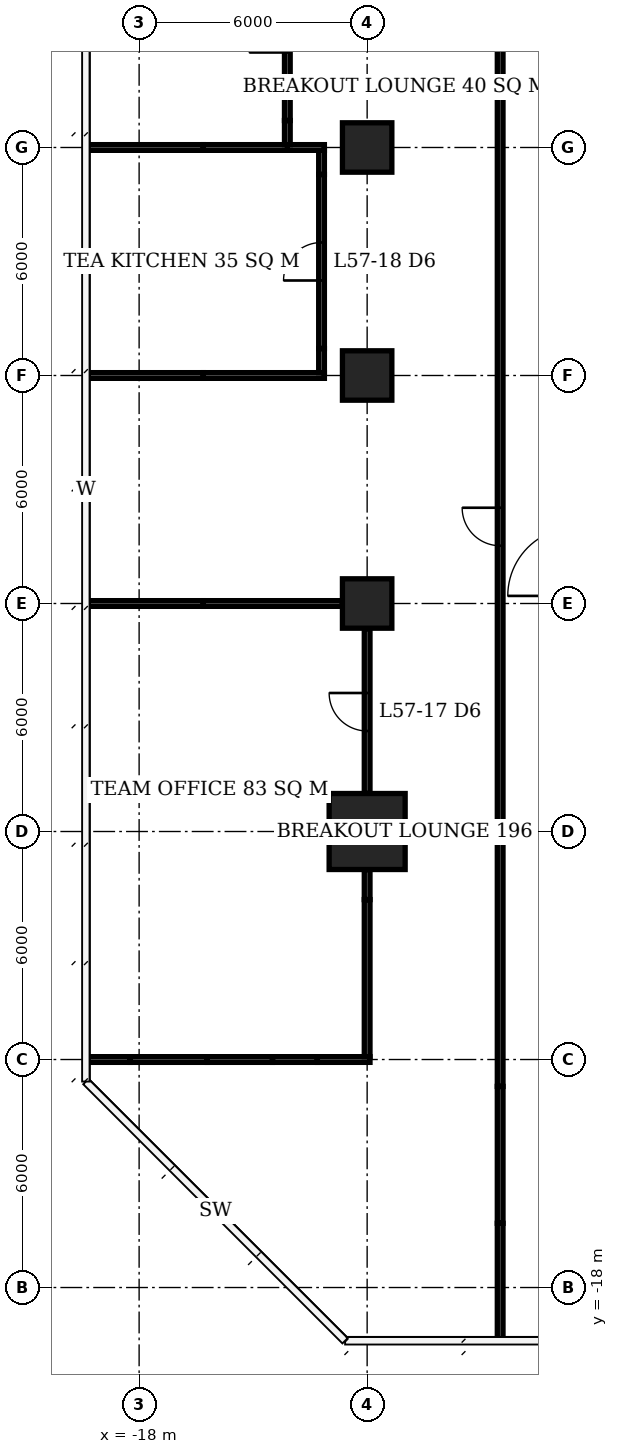
"""IFC4 building model, lengths in metres.
Left out: names, types, materials, properties, quantities, classifications, styles, units other than length and angle.
Written with IfcOpenShell. Run it as: python <this file> out.ifc"""

import sys

from ifc_helpers import new_model, si_unit, direction, frame, frame_2d, origin, origin_2d, place, context, subcontext, project, spatial, rectangle, extrude, element, fill, save


model = new_model("IFC4")
c1 = context("Model", 3, precision=1e-05, world=origin(), true_north=direction((0.0, 1.0)))
c2 = subcontext(c1, "Body", "Model", "MODEL_VIEW")
j1 = project(units=[si_unit("LENGTHUNIT", "METRE"), si_unit("PLANEANGLEUNIT", "RADIAN")], contexts=[c1])
p1 = place(None, origin())
s1 = spatial("IfcSite", under=j1, at=p1, CompositionType="ELEMENT")
p2 = place(p1, origin())
s2 = spatial("IfcBuilding", under=s1, at=p2, CompositionType="ELEMENT")
p3 = place(p2, frame((0.0, 0.0, 231.8)))
s3 = spatial("IfcBuildingStorey", under=s2, at=p3, CompositionType="ELEMENT", Elevation=231.8)
p4 = place(p3, frame((-12.0, -6.0, 0.0), z_axis=(0.0, 0.0, 1.0), x_axis=(1.0, 0.0, 0.0)))
e1 = element("IfcColumn", 1, at=p4, inside=s3, PredefinedType="COLUMN", context=c2, shape_type="SweptSolid", body=[
    extrude(rectangle(XDim=2.0, YDim=2.0, at=origin_2d()), origin(), (0.0, 0.0, 1.0), 3.9),
])
for number, where, z_axis, x_axis in (
    (2, (-12.0, 0.0, 0.0), (0.0, 0.0, 1.0), (1.0, 0.0, 0.0)),
    (3, (-12.0, 6.0, 0.0), (0.0, 0.0, 1.0), (1.0, 0.0, 0.0)),
    (4, (-12.0, 12.0, 0.0), (0.0, 0.0, 1.0), (1.0, 0.0, 0.0)),
):
    element("IfcColumn", number, at=place(p3, frame(where, z_axis=z_axis, x_axis=x_axis)), inside=s3, PredefinedType="COLUMN", context=c2, shape_type="SweptSolid", body=[
        extrude(rectangle(XDim=1.3, YDim=1.3, at=origin_2d()), origin(), (0.0, 0.0, 1.0), 3.9),
    ])
p5 = place(p3, frame((-19.4, -12.0, 0.0), z_axis=(0.0, 0.0, 1.0), x_axis=(1.0, 0.0, 0.0)))
e5 = element("IfcWall", 5, at=p5, inside=s3, PredefinedType="PARTITIONING", context=c2, shape_type="SweptSolid", body=[
    extrude(rectangle(XDim=1.163, YDim=0.15, at=frame_2d((0.582, 0.0))), origin(), (0.0, 0.0, 1.0), 3.65),
])
p6 = place(p3, frame((-18.237, -12.0, 0.0), z_axis=(0.0, 0.0, 1.0), x_axis=(1.0, 0.0, 0.0)))
e6 = element("IfcWall", 6, at=p6, inside=s3, PredefinedType="PARTITIONING", context=c2, shape_type="SweptSolid", body=[
    extrude(rectangle(XDim=2.029, YDim=0.15, at=frame_2d((1.015, 0.0))), origin(), (0.0, 0.0, 1.0), 2.65),
])
p7 = place(p3, frame((-16.208, -12.0, 0.0), z_axis=(0.0, 0.0, 1.0), x_axis=(1.0, 0.0, 0.0)))
e7 = element("IfcWall", 7, at=p7, inside=s3, PredefinedType="PARTITIONING", context=c2, shape_type="SweptSolid", body=[
    extrude(rectangle(XDim=1.718, YDim=0.15, at=frame_2d((0.859, 0.0))), origin(), (0.0, 0.0, 1.0), 3.65),
])
p8 = place(p3, frame((-14.49, -12.0, 0.0), z_axis=(0.0, 0.0, 1.0), x_axis=(1.0, 0.0, 0.0)))
e8 = element("IfcWall", 8, at=p8, inside=s3, PredefinedType="PARTITIONING", context=c2, shape_type="SweptSolid", body=[
    extrude(rectangle(XDim=1.18, YDim=0.15, at=frame_2d((0.59, 0.0))), origin(), (0.0, 0.0, 1.0), 2.65),
])
p9 = place(p3, frame((-13.31, -12.0, 0.0), z_axis=(0.0, 0.0, 1.0), x_axis=(1.0, 0.0, 0.0)))
e9 = element("IfcWall", 9, at=p9, inside=s3, PredefinedType="PARTITIONING", context=c2, shape_type="SweptSolid", body=[
    extrude(rectangle(XDim=1.385, YDim=0.15, at=frame_2d((0.692, 0.0))), origin(), (0.0, 0.0, 1.0), 3.65),
])
p10 = place(p3, frame((-19.35, 0.0, 0.0), z_axis=(0.0, 0.0, 1.0), x_axis=(1.0, 0.0, 0.0)))
e10 = element("IfcWall", 10, at=p10, inside=s3, PredefinedType="PARTITIONING", context=c2, shape_type="SweptSolid", body=[
    extrude(rectangle(XDim=3.04, YDim=0.15, at=frame_2d((1.52, 0.0))), origin(), (0.0, 0.0, 1.0), 3.65),
])
p11 = place(p3, frame((-16.31, 0.0, 0.0), z_axis=(0.0, 0.0, 1.0), x_axis=(1.0, 0.0, 0.0)))
e11 = element("IfcWall", 11, at=p11, inside=s3, PredefinedType="PARTITIONING", context=c2, shape_type="SweptSolid", body=[
    extrude(rectangle(XDim=3.66, YDim=0.15, at=frame_2d((1.83, 0.0))), origin(), (0.0, 0.0, 1.0), 2.65),
])
p12 = place(p3, frame((-19.35, 6.0, 0.0), z_axis=(0.0, 0.0, 1.0), x_axis=(1.0, 0.0, 0.0)))
e12 = element("IfcWall", 12, at=p12, inside=s3, PredefinedType="PARTITIONING", context=c2, shape_type="SweptSolid", body=[
    extrude(rectangle(XDim=3.04, YDim=0.15, at=frame_2d((1.52, 0.0))), origin(), (0.0, 0.0, 1.0), 3.65),
])
p13 = place(p3, frame((-16.31, 6.0, 0.0), z_axis=(0.0, 0.0, 1.0), x_axis=(1.0, 0.0, 0.0)))
e13 = element("IfcWall", 13, at=p13, inside=s3, PredefinedType="PARTITIONING", context=c2, shape_type="SweptSolid", body=[
    extrude(rectangle(XDim=3.185, YDim=0.15, at=frame_2d((1.593, 0.0))), origin(), (0.0, 0.0, 1.0), 2.65),
])
p14 = place(p3, frame((-19.4, 12.0, 0.0), z_axis=(0.0, 0.0, 1.0), x_axis=(1.0, 0.0, 0.0)))
e14 = element("IfcWall", 14, at=p14, inside=s3, PredefinedType="PARTITIONING", context=c2, shape_type="SweptSolid", body=[
    extrude(rectangle(XDim=3.09, YDim=0.15, at=frame_2d((1.545, 0.0))), origin(), (0.0, 0.0, 1.0), 3.65),
])
p15 = place(p3, frame((-16.31, 12.0, 0.0), z_axis=(0.0, 0.0, 1.0), x_axis=(1.0, 0.0, 0.0)))
e15 = element("IfcWall", 15, at=p15, inside=s3, PredefinedType="PARTITIONING", context=c2, shape_type="SweptSolid", body=[
    extrude(rectangle(XDim=2.285, YDim=0.15, at=frame_2d((1.143, 0.0))), origin(), (0.0, 0.0, 1.0), 2.65),
])
p16 = place(p3, frame((-14.1, 12.0, 0.0), z_axis=(0.0, 0.0, 1.0), x_axis=(1.0, 0.0, 0.0)))
e16 = element("IfcWall", 16, at=p16, inside=s3, PredefinedType="PARTITIONING", context=c2, shape_type="SweptSolid", body=[
    extrude(rectangle(XDim=0.975, YDim=0.15, at=frame_2d((0.488, 0.0))), origin(), (0.0, 0.0, 1.0), 2.65),
])
p17 = place(p3, frame((-14.1, 12.075, 0.0), z_axis=(0.0, 0.0, 1.0), x_axis=(0.0, 1.0, 0.0)))
e17 = element("IfcWall", 17, at=p17, inside=s3, PredefinedType="PARTITIONING", context=c2, shape_type="SweptSolid", body=[
    extrude(rectangle(XDim=0.635, YDim=0.15, at=frame_2d((0.317, 0.0))), origin(), (0.0, 0.0, 1.0), 2.65),
])
p18 = place(p3, frame((-14.1, 12.71, 0.0), z_axis=(0.0, 0.0, 1.0), x_axis=(0.0, 1.0, 0.0)))
e18 = element("IfcWall", 18, at=p18, inside=s3, PredefinedType="PARTITIONING", context=c2, shape_type="SweptSolid", body=[
    extrude(rectangle(XDim=4.58, YDim=0.15, at=frame_2d((2.29, 0.0))), origin(), (0.0, 0.0, 1.0), 3.65),
])
p19 = place(p18, frame((1.79, 0.0, 0.0)))
e19 = element("IfcOpeningElement", 19, at=p19, cuts=e18, PredefinedType="OPENING", context=c2, shape_type="SweptSolid", body=[
    extrude(rectangle(XDim=1.0, YDim=2.1, at=frame_2d((0.5, 1.05))), frame((0.0, 0.085, 0.0), z_axis=(0.0, -1.0, 0.0), x_axis=(1.0, 0.0, 0.0)), (0.0, 0.0, 1.0), 0.17),
])
p20 = place(p3, frame((-13.2, 6.075, 0.0), z_axis=(0.0, 0.0, 1.0), x_axis=(0.0, 1.0, 0.0)))
e20 = element("IfcWall", 20, at=p20, inside=s3, PredefinedType="PARTITIONING", context=c2, shape_type="SweptSolid", body=[
    extrude(rectangle(XDim=0.635, YDim=0.15, at=frame_2d((0.317, 0.0))), origin(), (0.0, 0.0, 1.0), 2.65),
])
p21 = place(p3, frame((-13.2, 6.71, 0.0), z_axis=(0.0, 0.0, 1.0), x_axis=(0.0, 1.0, 0.0)))
e21 = element("IfcWall", 21, at=p21, inside=s3, PredefinedType="PARTITIONING", context=c2, shape_type="SweptSolid", body=[
    extrude(rectangle(XDim=4.58, YDim=0.15, at=frame_2d((2.29, 0.0))), origin(), (0.0, 0.0, 1.0), 3.65),
])
p22 = place(p21, frame((1.79, 0.0, 0.0)))
e22 = element("IfcOpeningElement", 22, at=p22, cuts=e21, PredefinedType="OPENING", context=c2, shape_type="SweptSolid", body=[
    extrude(rectangle(XDim=1.0, YDim=2.1, at=frame_2d((0.5, 1.05))), frame((0.0, 0.085, 0.0), z_axis=(0.0, -1.0, 0.0), x_axis=(1.0, 0.0, 0.0)), (0.0, 0.0, 1.0), 0.17),
])
p23 = place(p3, frame((-13.2, 11.29, 0.0), z_axis=(0.0, 0.0, 1.0), x_axis=(0.0, 1.0, 0.0)))
e23 = element("IfcWall", 23, at=p23, inside=s3, PredefinedType="PARTITIONING", context=c2, shape_type="SweptSolid", body=[
    extrude(rectangle(XDim=0.635, YDim=0.15, at=frame_2d((0.317, 0.0))), origin(), (0.0, 0.0, 1.0), 2.65),
])
p24 = place(p3, frame((-12.0, -11.925, 0.0), z_axis=(0.0, 0.0, 1.0), x_axis=(0.0, 1.0, 0.0)))
e24 = element("IfcWall", 24, at=p24, inside=s3, PredefinedType="PARTITIONING", context=c2, shape_type="SweptSolid", body=[
    extrude(rectangle(XDim=4.133, YDim=0.15, at=frame_2d((2.066, 0.0))), origin(), (0.0, 0.0, 1.0), 3.65),
])
p25 = place(p3, frame((-12.0, -7.792, 0.0), z_axis=(0.0, 0.0, 1.0), x_axis=(0.0, 1.0, 0.0)))
e25 = element("IfcWall", 25, at=p25, inside=s3, PredefinedType="PARTITIONING", context=c2, shape_type="SweptSolid", body=[
    extrude(rectangle(XDim=0.792, YDim=0.15, at=frame_2d((0.396, 0.0))), origin(), (0.0, 0.0, 1.0), 2.65),
])
p26 = place(p3, frame((-12.0, -5.0, 0.0), z_axis=(0.0, 0.0, 1.0), x_axis=(0.0, 1.0, 0.0)))
e26 = element("IfcWall", 26, at=p26, inside=s3, PredefinedType="PARTITIONING", context=c2, shape_type="SweptSolid", body=[
    extrude(rectangle(XDim=4.34, YDim=0.15, at=frame_2d((2.17, 0.0))), origin(), (0.0, 0.0, 1.0), 3.65),
])
p27 = place(p26, frame((1.645, 0.0, 0.0)))
e27 = element("IfcOpeningElement", 27, at=p27, cuts=e26, PredefinedType="OPENING", context=c2, shape_type="SweptSolid", body=[
    extrude(rectangle(XDim=1.0, YDim=2.1, at=frame_2d((0.5, 1.05))), frame((0.0, 0.085, 0.0), z_axis=(0.0, -1.0, 0.0), x_axis=(1.0, 0.0, 0.0)), (0.0, 0.0, 1.0), 0.17),
])
p28 = place(p3, frame((-14.025, 13.5, 0.0), z_axis=(0.0, 0.0, 1.0), x_axis=(1.0, 0.0, 0.0)))
e28 = element("IfcWall", 28, at=p28, inside=s3, PredefinedType="PARTITIONING", context=c2, shape_type="SweptSolid", body=[
    extrude(rectangle(XDim=5.675, YDim=0.15, at=frame_2d((2.837, 0.0))), origin(), (0.0, 0.0, 1.0), 3.65),
])
p29 = place(p3, frame((-8.5, -19.4, 0.0), z_axis=(0.0, 0.0, 1.0), x_axis=(0.0, 1.0, 0.0)))
e29 = element("IfcWall", 29, at=p29, inside=s3, PredefinedType="PARTITIONING", context=c2, shape_type="SweptSolid", body=[
    extrude(rectangle(XDim=3.09, YDim=0.15, at=frame_2d((1.545, 0.0))), origin(), (0.0, 0.0, 1.0), 3.65),
])
p30 = place(p3, frame((-8.5, -16.31, 0.0), z_axis=(0.0, 0.0, 1.0), x_axis=(0.0, 1.0, 0.0)))
e30 = element("IfcWall", 30, at=p30, inside=s3, PredefinedType="PARTITIONING", context=c2, shape_type="SweptSolid", body=[
    extrude(rectangle(XDim=3.602, YDim=0.15, at=frame_2d((1.801, 0.0))), origin(), (0.0, 0.0, 1.0), 2.65),
])
p31 = place(p3, frame((-8.5, -12.708, 0.0), z_axis=(0.0, 0.0, 1.0), x_axis=(0.0, 1.0, 0.0)))
e31 = element("IfcWall", 31, at=p31, inside=s3, PredefinedType="PARTITIONING", context=c2, shape_type="SweptSolid", body=[
    extrude(rectangle(XDim=26.133, YDim=0.15, at=frame_2d((13.066, 0.0))), origin(), (0.0, 0.0, 1.0), 3.65),
])
p32 = place(p31, frame((14.228, 0.0, 0.0)))
e32 = element("IfcOpeningElement", 32, at=p32, cuts=e31, PredefinedType="OPENING", context=c2, shape_type="SweptSolid", body=[
    extrude(rectangle(XDim=1.0, YDim=2.1, at=frame_2d((0.5, 1.05))), frame((0.0, 0.085, 0.0), z_axis=(0.0, -1.0, 0.0), x_axis=(1.0, 0.0, 0.0)), (0.0, 0.0, 1.0), 0.17),
])
p33 = place(p3, frame((-8.5, 13.575, 0.0), z_axis=(0.0, 0.0, 1.0), x_axis=(0.0, 1.0, 0.0)))
e33 = element("IfcWall", 33, at=p33, inside=s3, PredefinedType="PARTITIONING", context=c2, shape_type="SweptSolid", body=[
    extrude(rectangle(XDim=5.85, YDim=0.15, at=frame_2d((2.925, 0.0))), origin(), (0.0, 0.0, 1.0), 3.65),
])
p34 = place(p33, frame((3.325, 0.0, 0.0)))
e34 = element("IfcOpeningElement", 34, at=p34, cuts=e33, PredefinedType="OPENING", context=c2, shape_type="SweptSolid", body=[
    extrude(rectangle(XDim=1.0, YDim=2.1, at=frame_2d((0.5, 1.05))), frame((0.0, 0.085, 0.0), z_axis=(0.0, -1.0, 0.0), x_axis=(1.0, 0.0, 0.0)), (0.0, 0.0, 1.0), 0.17),
])
p35 = place(p27, origin())
e35 = element("IfcDoor", 35, at=p35, inside=s3, OperationType="SINGLE_SWING_RIGHT", PredefinedType="DOOR", context=c2, shape_type="SweptSolid", body=[
    extrude(rectangle(XDim=1.0, YDim=2.1, at=frame_2d((0.5, 1.05))), frame((0.0, 0.025, 0.0), z_axis=(0.0, -1.0, 0.0), x_axis=(1.0, 0.0, 0.0)), (0.0, 0.0, 1.0), 0.05),
])
fill(e27, e35)
p36 = place(p22, origin())
e36 = element("IfcDoor", 36, at=p36, inside=s3, OperationType="SINGLE_SWING_LEFT", PredefinedType="DOOR", context=c2, shape_type="SweptSolid", body=[
    extrude(rectangle(XDim=1.0, YDim=2.1, at=frame_2d((0.5, 1.05))), frame((0.0, 0.025, 0.0), z_axis=(0.0, -1.0, 0.0), x_axis=(1.0, 0.0, 0.0)), (0.0, 0.0, 1.0), 0.05),
])
fill(e22, e36)
p37 = place(p32, origin())
e37 = element("IfcDoor", 37, at=p37, inside=s3, OperationType="SINGLE_SWING_RIGHT", PredefinedType="DOOR", context=c2, shape_type="SweptSolid", body=[
    extrude(rectangle(XDim=1.0, YDim=2.1, at=frame_2d((0.5, 1.05))), frame((0.0, 0.025, 0.0), z_axis=(0.0, -1.0, 0.0), x_axis=(1.0, 0.0, 0.0)), (0.0, 0.0, 1.0), 0.05),
])
fill(e32, e37)
save(model, sys.argv[1])
